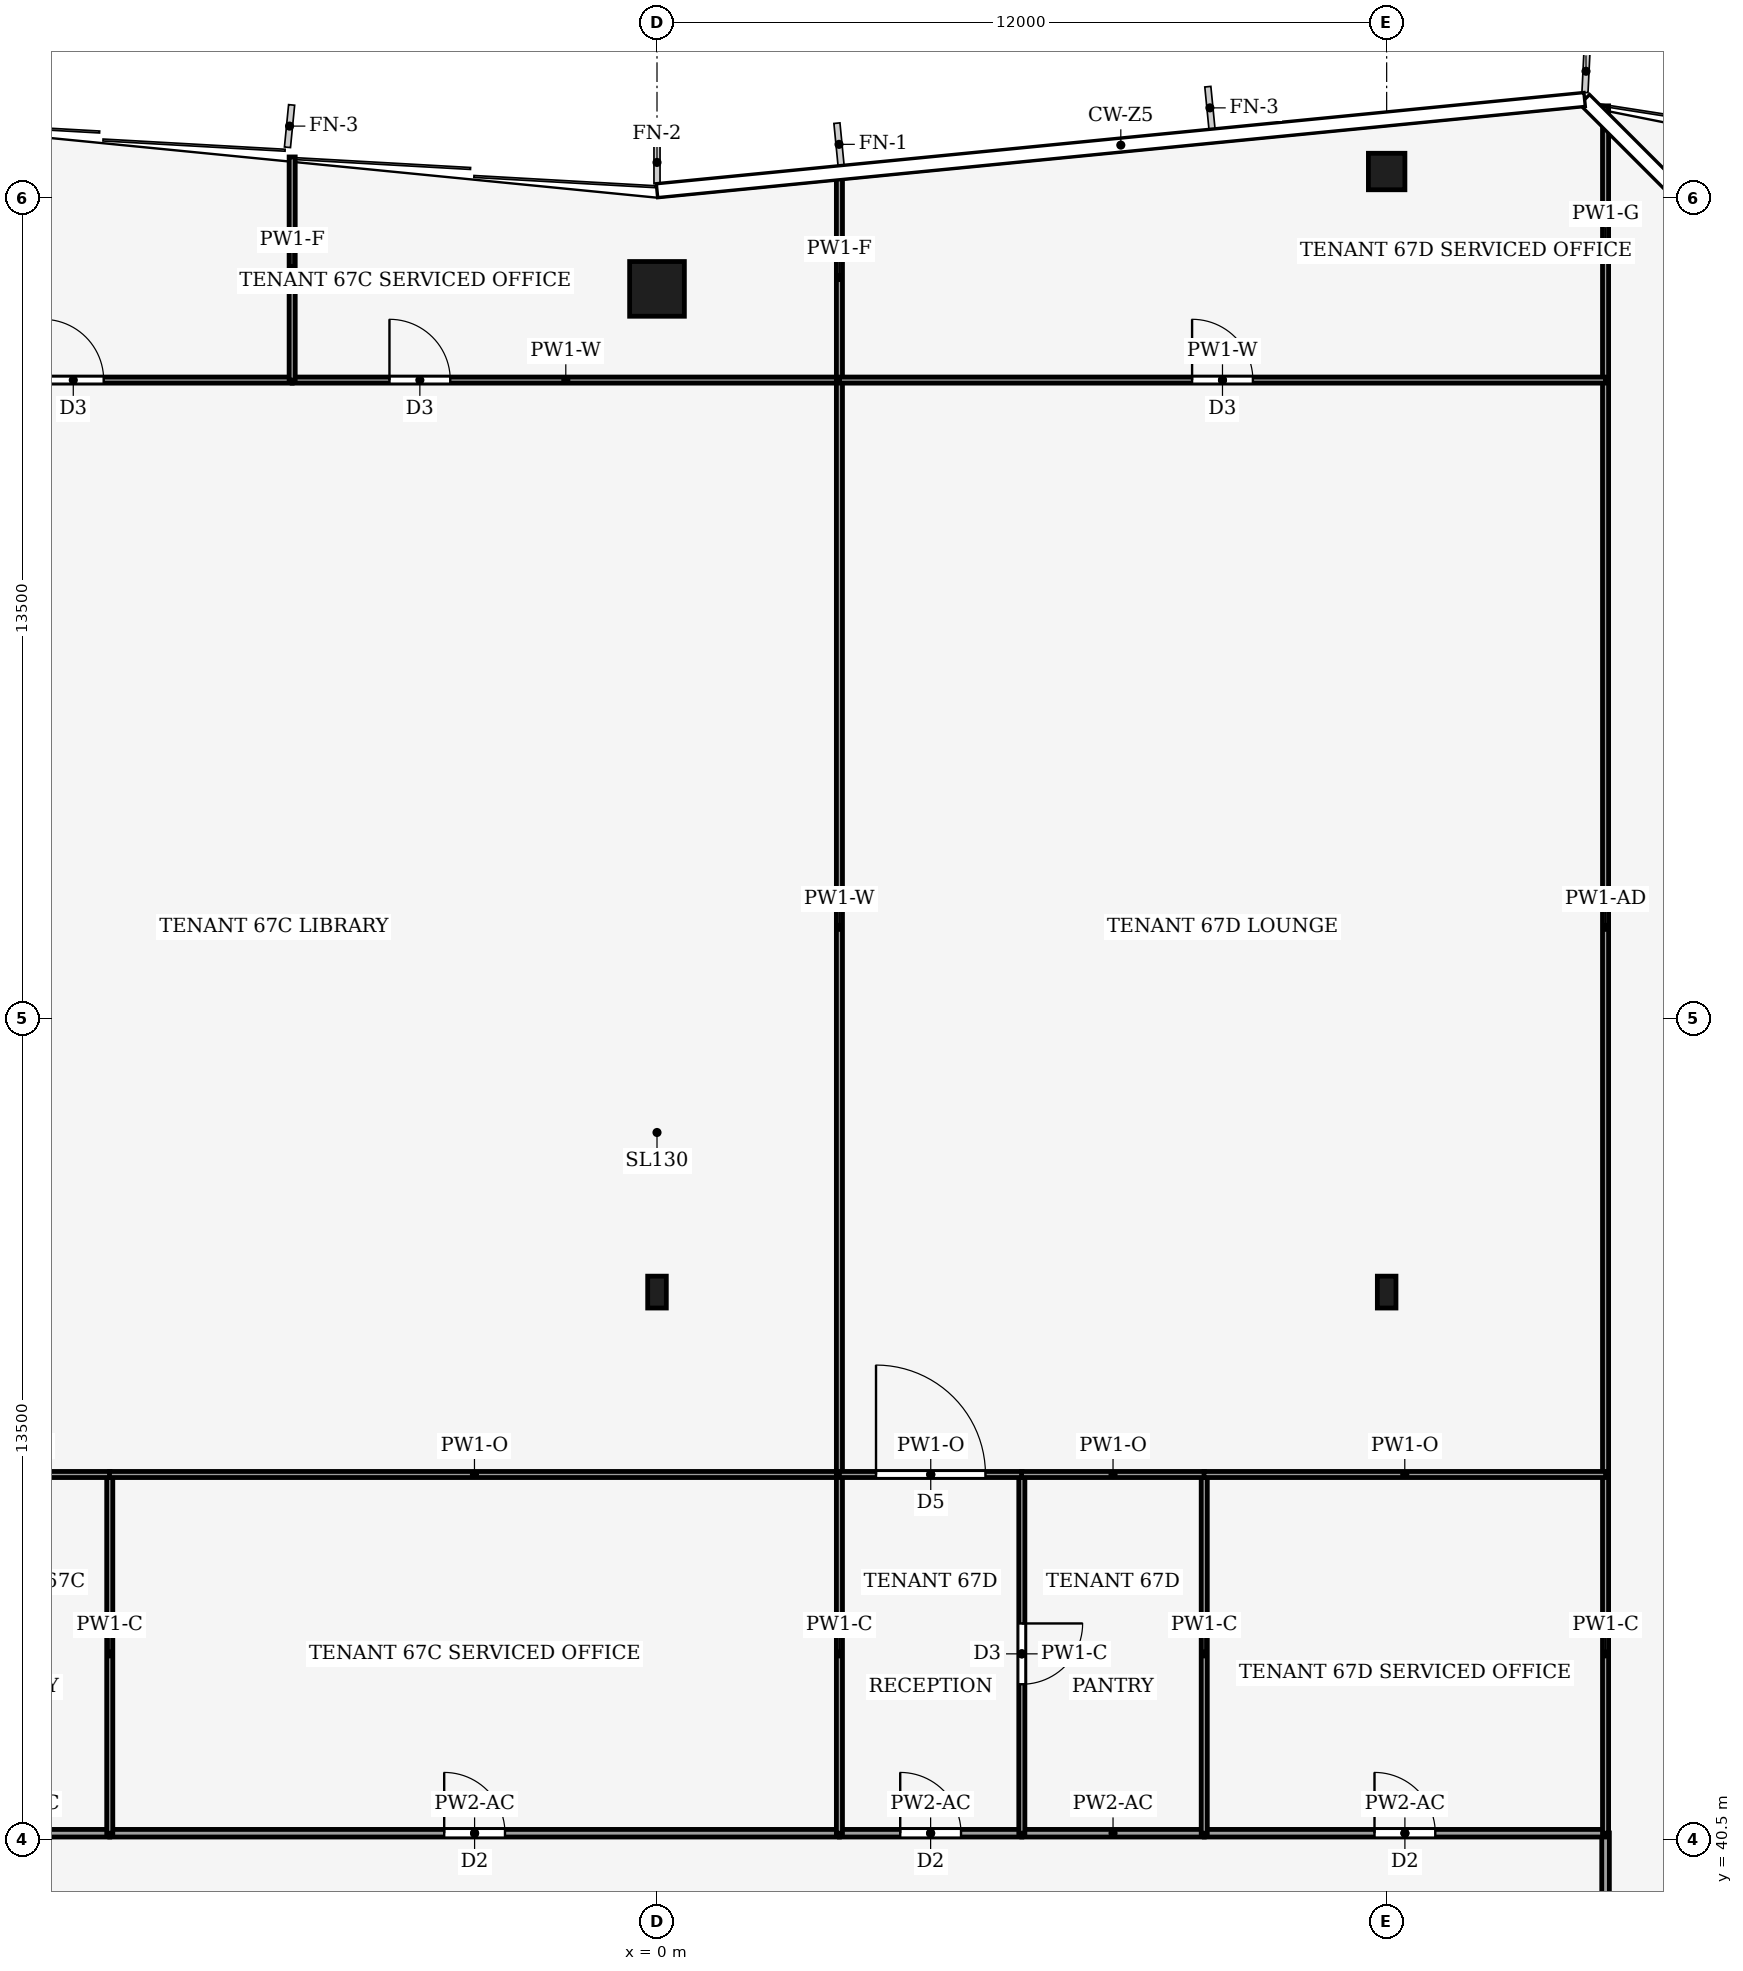
"""IFC4 building model, lengths in metres.
Left out: names, types, materials, properties, quantities, classifications, styles, units other than length and angle.
Written with IfcOpenShell. Run it as: python <this file> out.ifc"""

import sys

from ifc_helpers import new_model, si_unit, direction, frame, frame_2d, origin, origin_2d, place, context, subcontext, project, spatial, rectangle, hollow_rectangle, i_section, extrude, element, fill, save


model = new_model("IFC4")
c1 = context("Model", 3, precision=1e-05, world=origin(), true_north=direction((0.0, 1.0)))
c2 = subcontext(c1, "Body", "Model", "MODEL_VIEW")
j1 = project(units=[si_unit("LENGTHUNIT", "METRE"), si_unit("PLANEANGLEUNIT", "RADIAN")], contexts=[c1])
p1 = place(None, origin())
s1 = spatial("IfcSite", under=j1, at=p1, CompositionType="ELEMENT")
p2 = place(p1, origin())
s2 = spatial("IfcBuilding", under=s1, at=p2, CompositionType="ELEMENT")
p3 = place(p2, frame((0.0, 0.0, 294.0)))
s3 = spatial("IfcBuildingStorey", under=s2, at=p3, CompositionType="ELEMENT", Elevation=294.0)
p4 = place(p3, frame((0.0, 66.0, 0.0), z_axis=(0.0, 0.0, 1.0), x_axis=(1.0, 0.0, 0.0)))
e1 = element("IfcColumn", 1, at=p4, inside=s3, PredefinedType="COLUMN", context=c2, shape_type="SweptSolid", body=[
    extrude(hollow_rectangle(XDim=0.9, YDim=0.9, WallThickness=0.04, at=origin_2d()), origin(), (0.0, 0.0, 1.0), 4.0),
])
p5 = place(p3, frame((12.0, 67.93, 0.0), z_axis=(0.0, 0.0, 1.0), x_axis=(1.0, 0.0, 0.0)))
e2 = element("IfcColumn", 2, at=p5, inside=s3, PredefinedType="COLUMN", context=c2, shape_type="SweptSolid", body=[
    extrude(hollow_rectangle(XDim=0.6, YDim=0.6, WallThickness=0.025, at=origin_2d()), origin(), (0.0, 0.0, 1.0), 4.0),
])
for number, where, z_axis, x_axis in (
    (3, (0.0, 49.5, 0.0), (0.0, 0.0, 1.0), (1.0, 0.0, 0.0)),
    (4, (12.0, 49.5, 0.0), (0.0, 0.0, 1.0), (1.0, 0.0, 0.0)),
):
    element("IfcColumn", number, at=place(p3, frame(where, z_axis=z_axis, x_axis=x_axis)), inside=s3, PredefinedType="COLUMN", context=c2, shape_type="SweptSolid", body=[
        extrude(i_section(OverallWidth=0.306, OverallDepth=0.524, WebThickness=0.012, FlangeThickness=0.04, FilletRadius=0.027, at=origin_2d()), origin(), (0.0, 0.0, 1.0), 4.0),
    ])
p6 = place(p3, frame((15.6, 40.604, 0.0), z_axis=(0.0, 0.0, 1.0), x_axis=(0.0, -1.0, 0.0)))
e5 = element("IfcWall", 5, at=p6, inside=s3, PredefinedType="PARTITIONING", context=c2, shape_type="SweptSolid", body=[
    extrude(rectangle(XDim=6.104, YDim=0.125, at=frame_2d((3.052, 0.0))), origin(), (0.0, 0.0, 1.0), 3.14),
])
p7 = place(p6, frame((2.552, 0.0, 0.0)))
e6 = element("IfcOpeningElement", 6, at=p7, cuts=e5, PredefinedType="OPENING", context=c2, shape_type="SweptSolid", body=[
    extrude(rectangle(XDim=1.0, YDim=2.1, at=frame_2d((0.5, 1.05))), frame((0.0, 0.073, 0.0), z_axis=(0.0, -1.0, 0.0), x_axis=(1.0, 0.0, 0.0)), (0.0, 0.0, 1.0), 0.145),
])
p8 = place(p3, frame((-9.0, 40.6, 0.0), z_axis=(0.0, 0.0, 1.0), x_axis=(-1.0, 0.0, 0.0)))
e7 = element("IfcWall", 7, at=p8, inside=s3, PredefinedType="PARTITIONING", context=c2, shape_type="SweptSolid", body=[
    extrude(rectangle(XDim=3.0, YDim=0.125, at=frame_2d((1.5, 0.0))), origin(), (0.0, 0.0, 1.0), 3.39),
])
p9 = place(p3, frame((-9.0, 40.6, 0.0), z_axis=(0.0, 0.0, 1.0), x_axis=(1.0, 0.0, 0.0)))
e8 = element("IfcWall", 8, at=p9, inside=s3, PredefinedType="PARTITIONING", context=c2, shape_type="SweptSolid", body=[
    extrude(rectangle(XDim=12.0, YDim=0.125, at=frame_2d((6.0, 0.0))), origin(), (0.0, 0.0, 1.0), 3.39),
])
p10 = place(p9, frame((5.5, 0.0, 0.0)))
e9 = element("IfcOpeningElement", 9, at=p10, cuts=e8, PredefinedType="OPENING", context=c2, shape_type="SweptSolid", body=[
    extrude(rectangle(XDim=1.0, YDim=2.1, at=frame_2d((0.5, 1.05))), frame((0.0, 0.073, 0.0), z_axis=(0.0, -1.0, 0.0), x_axis=(1.0, 0.0, 0.0)), (0.0, 0.0, 1.0), 0.145),
])
p11 = place(p3, frame((3.0, 40.6, 0.0), z_axis=(0.0, 0.0, 1.0), x_axis=(1.0, 0.0, 0.0)))
e10 = element("IfcWall", 10, at=p11, inside=s3, PredefinedType="PARTITIONING", context=c2, shape_type="SweptSolid", body=[
    extrude(rectangle(XDim=3.0, YDim=0.125, at=frame_2d((1.5, 0.0))), origin(), (0.0, 0.0, 1.0), 3.39),
])
p12 = place(p11, frame((1.0, 0.0, 0.0)))
e11 = element("IfcOpeningElement", 11, at=p12, cuts=e10, PredefinedType="OPENING", context=c2, shape_type="SweptSolid", body=[
    extrude(rectangle(XDim=1.0, YDim=2.1, at=frame_2d((0.5, 1.05))), frame((0.0, 0.073, 0.0), z_axis=(0.0, -1.0, 0.0), x_axis=(1.0, 0.0, 0.0)), (0.0, 0.0, 1.0), 0.145),
])
p13 = place(p3, frame((9.0, 40.6, 0.0), z_axis=(0.0, 0.0, 1.0), x_axis=(-1.0, 0.0, 0.0)))
e12 = element("IfcWall", 12, at=p13, inside=s3, PredefinedType="PARTITIONING", context=c2, shape_type="SweptSolid", body=[
    extrude(rectangle(XDim=3.0, YDim=0.125, at=frame_2d((1.5, 0.0))), origin(), (0.0, 0.0, 1.0), 3.39),
])
p14 = place(p3, frame((9.0, 40.6, 0.0), z_axis=(0.0, 0.0, 1.0), x_axis=(1.0, 0.0, 0.0)))
e13 = element("IfcWall", 13, at=p14, inside=s3, PredefinedType="PARTITIONING", context=c2, shape_type="SweptSolid", body=[
    extrude(rectangle(XDim=6.6, YDim=0.125, at=frame_2d((3.3, 0.0))), origin(), (0.0, 0.0, 1.0), 3.39),
])
p15 = place(p14, frame((2.8, 0.0, 0.0)))
e14 = element("IfcOpeningElement", 14, at=p15, cuts=e13, PredefinedType="OPENING", context=c2, shape_type="SweptSolid", body=[
    extrude(rectangle(XDim=1.0, YDim=2.1, at=frame_2d((0.5, 1.05))), frame((0.0, 0.073, 0.0), z_axis=(0.0, -1.0, 0.0), x_axis=(1.0, 0.0, 0.0)), (0.0, 0.0, 1.0), 0.145),
])
p16 = place(p3, frame((15.6, 46.5, 0.0), z_axis=(0.0, 0.0, 1.0), x_axis=(0.0, -1.0, 0.0)))
e15 = element("IfcWall", 15, at=p16, inside=s3, PredefinedType="PARTITIONING", context=c2, shape_type="SweptSolid", body=[
    extrude(rectangle(XDim=5.9, YDim=0.1, at=frame_2d((2.95, 0.0))), origin(), (0.0, 0.0, 1.0), 3.87),
])
p17 = place(p3, frame((15.6, 64.5, 0.0), z_axis=(0.0, 0.0, 1.0), x_axis=(0.0, -1.0, 0.0)))
e16 = element("IfcWall", 16, at=p17, inside=s3, PredefinedType="PARTITIONING", context=c2, shape_type="SweptSolid", body=[
    extrude(rectangle(XDim=18.0, YDim=0.1, at=frame_2d((9.0, 0.0))), origin(), (0.0, 0.0, 1.0), 3.35),
])
p18 = place(p3, frame((15.6, 69.01, 0.0), z_axis=(0.0, 0.0, 1.0), x_axis=(0.0, -1.0, 0.0)))
e17 = element("IfcWall", 17, at=p18, inside=s3, PredefinedType="PARTITIONING", context=c2, shape_type="SweptSolid", body=[
    extrude(rectangle(XDim=4.51, YDim=0.1, at=frame_2d((2.255, 0.0))), origin(), (0.0, 0.0, 1.0), 2.93),
])
p19 = place(p3, frame((-9.0, 40.6, 0.0), z_axis=(0.0, 0.0, 1.0), x_axis=(0.0, 1.0, 0.0)))
e18 = element("IfcWall", 18, at=p19, inside=s3, PredefinedType="PARTITIONING", context=c2, shape_type="SweptSolid", body=[
    extrude(rectangle(XDim=5.9, YDim=0.1, at=frame_2d((2.95, 0.0))), origin(), (0.0, 0.0, 1.0), 3.87),
])
p20 = place(p3, frame((-8.996, 46.5, 0.0), z_axis=(0.0, 0.0, 1.0), x_axis=(-1.0, 0.0, 0.0)))
e19 = element("IfcWall", 19, at=p20, inside=s3, PredefinedType="PARTITIONING", context=c2, shape_type="SweptSolid", body=[
    extrude(rectangle(XDim=3.008, YDim=0.1, at=frame_2d((1.504, 0.0))), origin(), (0.0, 0.0, 1.0), 3.87),
])
p21 = place(p3, frame((3.0, 46.5, 0.0), z_axis=(0.0, 0.0, 1.0), x_axis=(-1.0, 0.0, 0.0)))
e20 = element("IfcWall", 20, at=p21, inside=s3, PredefinedType="PARTITIONING", context=c2, shape_type="SweptSolid", body=[
    extrude(rectangle(XDim=12.004, YDim=0.1, at=frame_2d((6.002, 0.0))), origin(), (0.0, 0.0, 1.0), 3.39),
])
p22 = place(p3, frame((3.0, 40.6, 0.0), z_axis=(0.0, 0.0, 1.0), x_axis=(0.0, 1.0, 0.0)))
e21 = element("IfcWall", 21, at=p22, inside=s3, PredefinedType="PARTITIONING", context=c2, shape_type="SweptSolid", body=[
    extrude(rectangle(XDim=5.9, YDim=0.1, at=frame_2d((2.95, 0.0))), origin(), (0.0, 0.0, 1.0), 3.87),
])
p23 = place(p3, frame((-15.6, 64.5, 0.0), z_axis=(0.0, 0.0, 1.0), x_axis=(1.0, 0.0, 0.0)))
e22 = element("IfcWall", 22, at=p23, inside=s3, PredefinedType="PARTITIONING", context=c2, shape_type="SweptSolid", body=[
    extrude(rectangle(XDim=9.6, YDim=0.1, at=frame_2d((4.8, 0.0))), origin(), (0.0, 0.0, 1.0), 3.24),
])
p24 = place(p23, frame((5.5, 0.0, 0.0)))
e23 = element("IfcOpeningElement", 23, at=p24, cuts=e22, PredefinedType="OPENING", context=c2, shape_type="SweptSolid", body=[
    extrude(rectangle(XDim=1.0, YDim=2.1, at=frame_2d((0.5, 1.05))), frame((0.0, 0.06, 0.0), z_axis=(0.0, -1.0, 0.0), x_axis=(1.0, 0.0, 0.0)), (0.0, 0.0, 1.0), 0.12),
])
p25 = place(p3, frame((-6.0, 64.5, 0.0), z_axis=(0.0, 0.0, 1.0), x_axis=(1.0, 0.0, 0.0)))
e24 = element("IfcWall", 24, at=p25, inside=s3, PredefinedType="PARTITIONING", context=c2, shape_type="SweptSolid", body=[
    extrude(rectangle(XDim=9.0, YDim=0.1, at=frame_2d((4.5, 0.0))), origin(), (0.0, 0.0, 1.0), 3.24),
])
p26 = place(p25, frame((1.6, 0.0, 0.0)))
e25 = element("IfcOpeningElement", 25, at=p26, cuts=e24, PredefinedType="OPENING", context=c2, shape_type="SweptSolid", body=[
    extrude(rectangle(XDim=1.0, YDim=2.1, at=frame_2d((0.5, 1.05))), frame((0.0, 0.06, 0.0), z_axis=(0.0, -1.0, 0.0), x_axis=(1.0, 0.0, 0.0)), (0.0, 0.0, 1.0), 0.12),
])
p27 = place(p3, frame((3.0, 46.5, 0.0), z_axis=(0.0, 0.0, 1.0), x_axis=(0.0, 1.0, 0.0)))
e26 = element("IfcWall", 26, at=p27, inside=s3, PredefinedType="PARTITIONING", context=c2, shape_type="SweptSolid", body=[
    extrude(rectangle(XDim=18.0, YDim=0.1, at=frame_2d((9.0, 0.0))), origin(), (0.0, 0.0, 1.0), 3.24),
])
p28 = place(p3, frame((-6.0, 64.5, 0.0), z_axis=(0.0, 0.0, 1.0), x_axis=(0.0, 1.0, 0.0)))
e27 = element("IfcWall", 27, at=p28, inside=s3, PredefinedType="PARTITIONING", context=c2, shape_type="SweptSolid", body=[
    extrude(rectangle(XDim=3.67, YDim=0.1, at=frame_2d((1.835, 0.0))), origin(), (0.0, 0.0, 1.0), 3.04),
])
p29 = place(p3, frame((3.0, 64.5, 0.0), z_axis=(0.0, 0.0, 1.0), x_axis=(0.0, 1.0, 0.0)))
e28 = element("IfcWall", 28, at=p29, inside=s3, PredefinedType="PARTITIONING", context=c2, shape_type="SweptSolid", body=[
    extrude(rectangle(XDim=3.375, YDim=0.1, at=frame_2d((1.688, 0.0))), origin(), (0.0, 0.0, 1.0), 3.04),
])
p30 = place(p3, frame((6.0, 46.5, 0.0), z_axis=(0.0, 0.0, 1.0), x_axis=(0.0, -1.0, 0.0)))
e29 = element("IfcWall", 29, at=p30, inside=s3, PredefinedType="PARTITIONING", context=c2, shape_type="SweptSolid", body=[
    extrude(rectangle(XDim=5.9, YDim=0.1, at=frame_2d((2.95, 0.0))), origin(), (0.0, 0.0, 1.0), 3.87),
])
p31 = place(p30, frame((2.45, 0.0, 0.0)))
e30 = element("IfcOpeningElement", 30, at=p31, cuts=e29, PredefinedType="OPENING", context=c2, shape_type="SweptSolid", body=[
    extrude(rectangle(XDim=1.0, YDim=2.1, at=frame_2d((0.5, 1.05))), frame((0.0, 0.06, 0.0), z_axis=(0.0, -1.0, 0.0), x_axis=(1.0, 0.0, 0.0)), (0.0, 0.0, 1.0), 0.12),
])
p32 = place(p3, frame((3.0, 46.5, 0.0), z_axis=(0.0, 0.0, 1.0), x_axis=(1.0, 0.0, 0.0)))
e31 = element("IfcWall", 31, at=p32, inside=s3, PredefinedType="PARTITIONING", context=c2, shape_type="SweptSolid", body=[
    extrude(rectangle(XDim=3.004, YDim=0.1, at=frame_2d((1.502, 0.0))), origin(), (0.0, 0.0, 1.0), 3.39),
])
p33 = place(p32, frame((0.602, 0.0, 0.0)))
e32 = element("IfcOpeningElement", 32, at=p33, cuts=e31, PredefinedType="OPENING", context=c2, shape_type="SweptSolid", body=[
    extrude(rectangle(XDim=1.8, YDim=2.1, at=frame_2d((0.9, 1.05))), frame((0.0, 0.06, 0.0), z_axis=(0.0, -1.0, 0.0), x_axis=(1.0, 0.0, 0.0)), (0.0, 0.0, 1.0), 0.12),
])
p34 = place(p3, frame((9.0, 40.6, 0.0), z_axis=(0.0, 0.0, 1.0), x_axis=(0.0, 1.0, 0.0)))
e33 = element("IfcWall", 33, at=p34, inside=s3, PredefinedType="PARTITIONING", context=c2, shape_type="SweptSolid", body=[
    extrude(rectangle(XDim=5.9, YDim=0.1, at=frame_2d((2.95, 0.0))), origin(), (0.0, 0.0, 1.0), 3.87),
])
p35 = place(p3, frame((9.004, 46.5, 0.0), z_axis=(0.0, 0.0, 1.0), x_axis=(-1.0, 0.0, 0.0)))
e34 = element("IfcWall", 34, at=p35, inside=s3, PredefinedType="PARTITIONING", context=c2, shape_type="SweptSolid", body=[
    extrude(rectangle(XDim=3.008, YDim=0.1, at=frame_2d((1.504, 0.0))), origin(), (0.0, 0.0, 1.0), 3.39),
])
p36 = place(p3, frame((15.6, 46.5, 0.0), z_axis=(0.0, 0.0, 1.0), x_axis=(-1.0, 0.0, 0.0)))
e35 = element("IfcWall", 35, at=p36, inside=s3, PredefinedType="PARTITIONING", context=c2, shape_type="SweptSolid", body=[
    extrude(rectangle(XDim=6.604, YDim=0.1, at=frame_2d((3.302, 0.0))), origin(), (0.0, 0.0, 1.0), 3.39),
])
p37 = place(p3, frame((3.0, 64.5, 0.0), z_axis=(0.0, 0.0, 1.0), x_axis=(1.0, 0.0, 0.0)))
e36 = element("IfcWall", 36, at=p37, inside=s3, PredefinedType="PARTITIONING", context=c2, shape_type="SweptSolid", body=[
    extrude(rectangle(XDim=12.6, YDim=0.1, at=frame_2d((6.3, 0.0))), origin(), (0.0, 0.0, 1.0), 3.24),
])
p38 = place(p37, frame((5.8, 0.0, 0.0)))
e37 = element("IfcOpeningElement", 37, at=p38, cuts=e36, PredefinedType="OPENING", context=c2, shape_type="SweptSolid", body=[
    extrude(rectangle(XDim=1.0, YDim=2.1, at=frame_2d((0.5, 1.05))), frame((0.0, 0.06, 0.0), z_axis=(0.0, -1.0, 0.0), x_axis=(1.0, 0.0, 0.0)), (0.0, 0.0, 1.0), 0.12),
])
p39 = place(p10, origin())
e38 = element("IfcDoor", 38, at=p39, inside=s3, OperationType="SINGLE_SWING_RIGHT", PredefinedType="DOOR", context=c2, shape_type="SweptSolid", body=[
    extrude(rectangle(XDim=1.0, YDim=2.1, at=frame_2d((0.5, 1.05))), frame((0.0, 0.025, 0.0), z_axis=(0.0, -1.0, 0.0), x_axis=(1.0, 0.0, 0.0)), (0.0, 0.0, 1.0), 0.05),
])
fill(e9, e38)
p40 = place(p12, origin())
e39 = element("IfcDoor", 39, at=p40, inside=s3, OperationType="SINGLE_SWING_LEFT", PredefinedType="DOOR", context=c2, shape_type="SweptSolid", body=[
    extrude(rectangle(XDim=1.0, YDim=2.1, at=frame_2d((0.5, 1.05))), frame((0.0, 0.025, 0.0), z_axis=(0.0, -1.0, 0.0), x_axis=(1.0, 0.0, 0.0)), (0.0, 0.0, 1.0), 0.05),
])
fill(e11, e39)
p41 = place(p15, origin())
e40 = element("IfcDoor", 40, at=p41, inside=s3, OperationType="SINGLE_SWING_RIGHT", PredefinedType="DOOR", context=c2, shape_type="SweptSolid", body=[
    extrude(rectangle(XDim=1.0, YDim=2.1, at=frame_2d((0.5, 1.05))), frame((0.0, 0.025, 0.0), z_axis=(0.0, -1.0, 0.0), x_axis=(1.0, 0.0, 0.0)), (0.0, 0.0, 1.0), 0.05),
])
fill(e14, e40)
p42 = place(p24, origin())
e41 = element("IfcDoor", 41, at=p42, inside=s3, OperationType="SINGLE_SWING_RIGHT", PredefinedType="DOOR", context=c2, shape_type="SweptSolid", body=[
    extrude(rectangle(XDim=1.0, YDim=2.1, at=frame_2d((0.5, 1.05))), frame((0.0, 0.025, 0.0), z_axis=(0.0, -1.0, 0.0), x_axis=(1.0, 0.0, 0.0)), (0.0, 0.0, 1.0), 0.05),
])
fill(e23, e41)
p43 = place(p26, origin())
e42 = element("IfcDoor", 42, at=p43, inside=s3, OperationType="SINGLE_SWING_LEFT", PredefinedType="DOOR", context=c2, shape_type="SweptSolid", body=[
    extrude(rectangle(XDim=1.0, YDim=2.1, at=frame_2d((0.5, 1.05))), frame((0.0, 0.025, 0.0), z_axis=(0.0, -1.0, 0.0), x_axis=(1.0, 0.0, 0.0)), (0.0, 0.0, 1.0), 0.05),
])
fill(e25, e42)
p44 = place(p31, origin())
e43 = element("IfcDoor", 43, at=p44, inside=s3, OperationType="SINGLE_SWING_LEFT", PredefinedType="DOOR", context=c2, shape_type="SweptSolid", body=[
    extrude(rectangle(XDim=1.0, YDim=2.1, at=frame_2d((0.5, 1.05))), frame((0.0, 0.025, 0.0), z_axis=(0.0, -1.0, 0.0), x_axis=(1.0, 0.0, 0.0)), (0.0, 0.0, 1.0), 0.05),
])
fill(e30, e43)
p45 = place(p33, origin())
e44 = element("IfcDoor", 44, at=p45, inside=s3, OperationType="DOUBLE_DOOR_SINGLE_SWING", PredefinedType="DOOR", context=c2, shape_type="SweptSolid", body=[
    extrude(rectangle(XDim=1.8, YDim=2.1, at=frame_2d((0.9, 1.05))), frame((0.0, 0.025, 0.0), z_axis=(0.0, -1.0, 0.0), x_axis=(1.0, 0.0, 0.0)), (0.0, 0.0, 1.0), 0.05),
])
fill(e32, e44)
p46 = place(p38, origin())
e45 = element("IfcDoor", 45, at=p46, inside=s3, OperationType="SINGLE_SWING_LEFT", PredefinedType="DOOR", context=c2, shape_type="SweptSolid", body=[
    extrude(rectangle(XDim=1.0, YDim=2.1, at=frame_2d((0.5, 1.05))), frame((0.0, 0.025, 0.0), z_axis=(0.0, -1.0, 0.0), x_axis=(1.0, 0.0, 0.0)), (0.0, 0.0, 1.0), 0.05),
])
fill(e37, e45)
save(model, sys.argv[1])
